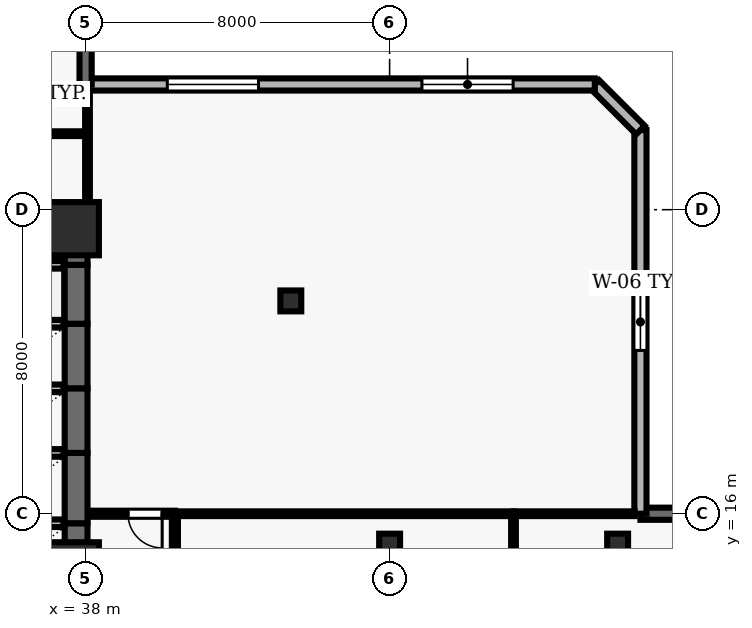
"""IFC4 building model, lengths in metres.
Left out: names, types, materials, properties, quantities, classifications, styles, units other than length and angle.
Written with IfcOpenShell. Run it as: python <this file> out.ifc"""

import sys

from ifc_helpers import new_model, si_unit, direction, frame, frame_2d, origin, origin_2d, place, context, subcontext, project, spatial, rectangle, hollow_rectangle, extrude, element, fill, save


model = new_model("IFC4")
c1 = context("Model", 3, precision=1e-05, world=origin(), true_north=direction((0.0, 1.0)))
c2 = subcontext(c1, "Body", "Model", "MODEL_VIEW")
j1 = project(units=[si_unit("LENGTHUNIT", "METRE"), si_unit("PLANEANGLEUNIT", "RADIAN")], contexts=[c1])
p1 = place(None, origin())
s1 = spatial("IfcSite", under=j1, at=p1, CompositionType="ELEMENT")
p2 = place(p1, origin())
s2 = spatial("IfcBuilding", under=s1, at=p2, CompositionType="ELEMENT")
p3 = place(p2, frame((0.0, 0.0, 54.4)))
s3 = spatial("IfcBuildingStorey", under=s2, at=p3, CompositionType="ELEMENT", Elevation=54.4)
for number, where, z_axis, x_axis in (
    (1, (37.65, 14.55, 0.0), (0.0, 0.0, 1.0), (1.0, 0.0, 0.0)),
    (2, (37.65, 23.5, 0.0), (0.0, 0.0, 1.0), (1.0, 0.0, 0.0)),
):
    element("IfcColumn", number, at=place(p3, frame(where, z_axis=z_axis, x_axis=x_axis)), inside=s3, PredefinedType="COLUMN", context=c2, shape_type="SweptSolid", body=[
        extrude(rectangle(XDim=1.4, YDim=1.4, at=origin_2d()), origin(), (0.0, 0.0, 1.0), 3.9),
    ])
for number, where, z_axis, x_axis in (
    (3, (46.0, 15.2, 0.0), (0.0, 0.0, 1.0), (1.0, 0.0, 0.0)),
    (4, (52.0, 15.2, 0.0), (0.0, 0.0, 1.0), (1.0, 0.0, 0.0)),
    (5, (43.4, 21.6, 0.0), (0.0, 0.0, 1.0), (1.0, 0.0, 0.0)),
):
    element("IfcColumn", number, at=place(p3, frame(where, z_axis=z_axis, x_axis=x_axis)), inside=s3, PredefinedType="COLUMN", context=c2, shape_type="SweptSolid", body=[
        extrude(hollow_rectangle(XDim=0.55, YDim=0.55, WallThickness=0.025, at=origin_2d()), origin(), (0.0, 0.0, 1.0), 3.9),
    ])
p4 = place(p3, frame((73.5, 16.0, 0.0), z_axis=(0.0, 0.0, 1.0), x_axis=(-1.0, 0.0, 0.0)))
e6 = element("IfcWall", 6, at=p4, inside=s3, PredefinedType="SOLIDWALL", context=c2, shape_type="SweptSolid", body=[
    extrude(rectangle(XDim=20.9, YDim=0.32, at=frame_2d((10.45, 0.0))), origin(), (0.0, 0.0, 1.0), 3.69),
])
p5 = place(p4, frame((12.05, 0.0, 0.0)))
e7 = element("IfcOpeningElement", 7, at=p5, cuts=e6, PredefinedType="OPENING", context=c2, shape_type="SweptSolid", body=[
    extrude(rectangle(XDim=1.0, YDim=2.2, at=frame_2d((0.5, 1.1))), frame((0.0, 0.17, 0.0), z_axis=(0.0, -1.0, 0.0), x_axis=(1.0, 0.0, 0.0)), (0.0, 0.0, 1.0), 0.34),
])
p6 = place(p4, frame((1.833, 0.0, 0.9)))
e8 = element("IfcOpeningElement", 8, at=p6, cuts=e6, PredefinedType="OPENING", context=c2, shape_type="SweptSolid", body=[
    extrude(rectangle(XDim=2.4, YDim=1.6, at=frame_2d((1.2, 0.8))), frame((0.0, 0.17, 0.0), z_axis=(0.0, -1.0, 0.0), x_axis=(1.0, 0.0, 0.0)), (0.0, 0.0, 1.0), 0.34),
])
p7 = place(p4, frame((16.667, 0.0, 0.9)))
e9 = element("IfcOpeningElement", 9, at=p7, cuts=e6, PredefinedType="OPENING", context=c2, shape_type="SweptSolid", body=[
    extrude(rectangle(XDim=2.4, YDim=1.6, at=frame_2d((1.2, 0.8))), frame((0.0, 0.17, 0.0), z_axis=(0.0, -1.0, 0.0), x_axis=(1.0, 0.0, 0.0)), (0.0, 0.0, 1.0), 0.34),
])
p8 = place(p3, frame((52.6, 16.0, 0.0), z_axis=(0.0, 0.0, 1.0), x_axis=(0.0, 1.0, 0.0)))
e10 = element("IfcWall", 10, at=p8, inside=s3, PredefinedType="SOLIDWALL", context=c2, shape_type="SweptSolid", body=[
    extrude(rectangle(XDim=10.095, YDim=0.32, at=frame_2d((5.047, 0.0))), origin(), (0.0, 0.0, 1.0), 3.69),
])
p9 = place(p8, frame((4.297, 0.0, 0.9)))
e11 = element("IfcOpeningElement", 11, at=p9, cuts=e10, PredefinedType="OPENING", context=c2, shape_type="SweptSolid", body=[
    extrude(rectangle(XDim=1.5, YDim=1.8, at=frame_2d((0.75, 0.9))), frame((0.0, 0.17, 0.0), z_axis=(0.0, -1.0, 0.0), x_axis=(1.0, 0.0, 0.0)), (0.0, 0.0, 1.0), 0.34),
])
p10 = place(p3, frame((52.6, 26.095, 0.0), z_axis=(0.0, 0.0, 1.0), x_axis=(-0.707178703759, 0.707034851297, 0.0)))
e12 = element("IfcWall", 12, at=p10, inside=s3, PredefinedType="SOLIDWALL", context=c2, shape_type="SweptSolid", body=[
    extrude(rectangle(XDim=1.697, YDim=0.32, at=frame_2d((0.849, 0.0))), origin(), (0.0, 0.0, 1.0), 3.69),
])
p11 = place(p3, frame((51.4, 27.295, 0.0), z_axis=(0.0, 0.0, 1.0), x_axis=(-1.0, 0.0, 0.0)))
e13 = element("IfcWall", 13, at=p11, inside=s3, PredefinedType="SOLIDWALL", context=c2, shape_type="SweptSolid", body=[
    extrude(rectangle(XDim=13.4, YDim=0.32, at=frame_2d((6.7, 0.0))), origin(), (0.0, 0.0, 1.0), 3.69),
])
p12 = place(p11, frame((2.15, 0.0, 0.9)))
e14 = element("IfcOpeningElement", 14, at=p12, cuts=e13, PredefinedType="OPENING", context=c2, shape_type="SweptSolid", body=[
    extrude(rectangle(XDim=2.4, YDim=1.8, at=frame_2d((1.2, 0.9))), frame((0.0, 0.17, 0.0), z_axis=(0.0, -1.0, 0.0), x_axis=(1.0, 0.0, 0.0)), (0.0, 0.0, 1.0), 0.34),
])
p13 = place(p11, frame((8.85, 0.0, 0.9)))
e15 = element("IfcOpeningElement", 15, at=p13, cuts=e13, PredefinedType="OPENING", context=c2, shape_type="SweptSolid", body=[
    extrude(rectangle(XDim=2.4, YDim=1.8, at=frame_2d((1.2, 0.9))), frame((0.0, 0.17, 0.0), z_axis=(0.0, -1.0, 0.0), x_axis=(1.0, 0.0, 0.0)), (0.0, 0.0, 1.0), 0.34),
])
p14 = place(p3, frame((38.0, 27.295, 0.0), z_axis=(0.0, 0.0, 1.0), x_axis=(0.0, 1.0, 0.0)))
e16 = element("IfcWall", 16, at=p14, inside=s3, PredefinedType="SOLIDWALL", context=c2, shape_type="SweptSolid", body=[
    extrude(rectangle(XDim=24.205, YDim=0.32, at=frame_2d((12.103, 0.0))), origin(), (0.0, 0.0, 1.0), 3.69),
])
p15 = place(p14, frame((16.303, 0.0, 0.0)))
e17 = element("IfcOpeningElement", 17, at=p15, cuts=e16, PredefinedType="OPENING", context=c2, shape_type="SweptSolid", body=[
    extrude(rectangle(XDim=1.0, YDim=2.2, at=frame_2d((0.5, 1.1))), frame((0.0, 0.17, 0.0), z_axis=(0.0, -1.0, 0.0), x_axis=(1.0, 0.0, 0.0)), (0.0, 0.0, 1.0), 0.34),
])
p16 = place(p14, frame((20.229, 0.0, 0.9)))
e18 = element("IfcOpeningElement", 18, at=p16, cuts=e16, PredefinedType="OPENING", context=c2, shape_type="SweptSolid", body=[
    extrude(rectangle(XDim=2.8, YDim=1.8, at=frame_2d((1.4, 0.9))), frame((0.0, 0.17, 0.0), z_axis=(0.0, -1.0, 0.0), x_axis=(1.0, 0.0, 0.0)), (0.0, 0.0, 1.0), 0.34),
])
p17 = place(p3, frame((37.75, 13.9, 0.0), z_axis=(0.0, 0.0, 1.0), x_axis=(0.0, 1.0, 0.0)))
e19 = element("IfcWall", 19, at=p17, inside=s3, PredefinedType="SHEAR", context=c2, shape_type="SweptSolid", body=[
    extrude(rectangle(XDim=1.85, YDim=0.6, at=frame_2d((0.925, 0.0))), origin(), (0.0, 0.0, 1.0), 3.69),
])
p18 = place(p3, frame((37.42, 15.75, 0.0), z_axis=(0.0, 0.0, 1.0), x_axis=(-1.0, 0.0, 0.0)))
e20 = element("IfcWall", 20, at=p18, inside=s3, PredefinedType="SOLIDWALL", context=c2, shape_type="SweptSolid", body=[
    extrude(rectangle(XDim=2.14, YDim=0.2, at=frame_2d((1.07, 0.0))), origin(), (0.0, 0.0, 1.0), 3.69),
])
p19 = place(p3, frame((37.75, 15.75, 0.0), z_axis=(0.0, 0.0, 1.0), x_axis=(0.0, 1.0, 0.0)))
e21 = element("IfcWall", 21, at=p19, inside=s3, PredefinedType="SHEAR", context=c2, shape_type="SweptSolid", body=[
    extrude(rectangle(XDim=1.85, YDim=0.6, at=frame_2d((0.925, 0.0))), origin(), (0.0, 0.0, 1.0), 3.69),
])
p20 = place(p3, frame((37.42, 17.6, 0.0), z_axis=(0.0, 0.0, 1.0), x_axis=(-1.0, 0.0, 0.0)))
e22 = element("IfcWall", 22, at=p20, inside=s3, PredefinedType="SOLIDWALL", context=c2, shape_type="SweptSolid", body=[
    extrude(rectangle(XDim=2.14, YDim=0.2, at=frame_2d((1.07, 0.0))), origin(), (0.0, 0.0, 1.0), 3.69),
])
p21 = place(p3, frame((37.75, 17.6, 0.0), z_axis=(0.0, 0.0, 1.0), x_axis=(0.0, 1.0, 0.0)))
e23 = element("IfcWall", 23, at=p21, inside=s3, PredefinedType="SHEAR", context=c2, shape_type="SweptSolid", body=[
    extrude(rectangle(XDim=1.7, YDim=0.6, at=frame_2d((0.85, 0.0))), origin(), (0.0, 0.0, 1.0), 3.69),
])
p22 = place(p3, frame((37.42, 19.3, 0.0), z_axis=(0.0, 0.0, 1.0), x_axis=(-1.0, 0.0, 0.0)))
e24 = element("IfcWall", 24, at=p22, inside=s3, PredefinedType="SOLIDWALL", context=c2, shape_type="SweptSolid", body=[
    extrude(rectangle(XDim=2.14, YDim=0.2, at=frame_2d((1.07, 0.0))), origin(), (0.0, 0.0, 1.0), 3.69),
])
p23 = place(p3, frame((37.75, 19.3, 0.0), z_axis=(0.0, 0.0, 1.0), x_axis=(0.0, 1.0, 0.0)))
e25 = element("IfcWall", 25, at=p23, inside=s3, PredefinedType="SHEAR", context=c2, shape_type="SweptSolid", body=[
    extrude(rectangle(XDim=1.7, YDim=0.6, at=frame_2d((0.85, 0.0))), origin(), (0.0, 0.0, 1.0), 3.69),
])
p24 = place(p3, frame((37.42, 21.0, 0.0), z_axis=(0.0, 0.0, 1.0), x_axis=(-1.0, 0.0, 0.0)))
e26 = element("IfcWall", 26, at=p24, inside=s3, PredefinedType="SOLIDWALL", context=c2, shape_type="SweptSolid", body=[
    extrude(rectangle(XDim=2.14, YDim=0.2, at=frame_2d((1.07, 0.0))), origin(), (0.0, 0.0, 1.0), 3.69),
])
p25 = place(p3, frame((37.75, 21.0, 0.0), z_axis=(0.0, 0.0, 1.0), x_axis=(0.0, 1.0, 0.0)))
e27 = element("IfcWall", 27, at=p25, inside=s3, PredefinedType="SHEAR", context=c2, shape_type="SweptSolid", body=[
    extrude(rectangle(XDim=1.55, YDim=0.6, at=frame_2d((0.775, 0.0))), origin(), (0.0, 0.0, 1.0), 3.69),
])
p26 = place(p3, frame((37.42, 22.55, 0.0), z_axis=(0.0, 0.0, 1.0), x_axis=(-1.0, 0.0, 0.0)))
e28 = element("IfcWall", 28, at=p26, inside=s3, PredefinedType="SOLIDWALL", context=c2, shape_type="SweptSolid", body=[
    extrude(rectangle(XDim=2.14, YDim=0.2, at=frame_2d((1.07, 0.0))), origin(), (0.0, 0.0, 1.0), 3.69),
])
p27 = place(p3, frame((37.75, 22.55, 0.0), z_axis=(0.0, 0.0, 1.0), x_axis=(0.0, 1.0, 0.0)))
e29 = element("IfcWall", 29, at=p27, inside=s3, PredefinedType="SHEAR", context=c2, shape_type="SweptSolid", body=[
    extrude(rectangle(XDim=1.5, YDim=0.6, at=frame_2d((0.75, 0.0))), origin(), (0.0, 0.0, 1.0), 3.69),
])
p28 = place(p3, frame((37.42, 24.05, 0.0), z_axis=(0.0, 0.0, 1.0), x_axis=(-1.0, 0.0, 0.0)))
e30 = element("IfcWall", 30, at=p28, inside=s3, PredefinedType="SOLIDWALL", context=c2, shape_type="SweptSolid", body=[
    extrude(rectangle(XDim=2.14, YDim=0.2, at=frame_2d((1.07, 0.0))), origin(), (0.0, 0.0, 1.0), 3.69),
])
p29 = place(p3, frame((35.15, 26.0, 0.0), z_axis=(0.0, 0.0, 1.0), x_axis=(1.0, 0.0, 0.0)))
e31 = element("IfcWall", 31, at=p29, inside=s3, PredefinedType="PARTITIONING", context=c2, shape_type="SweptSolid", body=[
    extrude(rectangle(XDim=2.7, YDim=0.125, at=frame_2d((1.35, 0.0))), origin(), (0.0, 0.0, 1.0), 3.69),
])
p30 = place(p3, frame((40.35, 16.0, 0.0), z_axis=(0.0, 0.0, 1.0), x_axis=(-1.0, 0.0, 0.0)))
e32 = element("IfcWall", 32, at=p30, inside=s3, PredefinedType="PARTITIONING", context=c2, shape_type="SweptSolid", body=[
    extrude(rectangle(XDim=2.27, YDim=0.16, at=frame_2d((1.135, 0.0))), origin(), (0.0, 0.0, 1.0), 3.69),
])
p31 = place(p30, frame((0.335, 0.0, 0.0)))
e33 = element("IfcOpeningElement", 33, at=p31, cuts=e32, PredefinedType="OPENING", context=c2, shape_type="SweptSolid", body=[
    extrude(rectangle(XDim=0.9, YDim=2.1, at=frame_2d((0.45, 1.05))), frame((0.0, 0.09, 0.0), z_axis=(0.0, -1.0, 0.0), x_axis=(1.0, 0.0, 0.0)), (0.0, 0.0, 1.0), 0.18),
])
p32 = place(p3, frame((49.26, 16.0, 0.0), z_axis=(0.0, 0.0, 1.0), x_axis=(1.0, 0.0, 0.0)))
e34 = element("IfcWall", 34, at=p32, inside=s3, PredefinedType="PARTITIONING", context=c2, shape_type="SweptSolid", body=[
    extrude(rectangle(XDim=3.185, YDim=0.125, at=frame_2d((1.593, 0.0))), origin(), (0.0, 0.0, 1.0), 3.39),
])
p33 = place(p3, frame((49.26, 16.0, 0.0), z_axis=(0.0, 0.0, 1.0), x_axis=(-1.0, 0.0, 0.0)))
e35 = element("IfcWall", 35, at=p33, inside=s3, PredefinedType="PARTITIONING", context=c2, shape_type="SweptSolid", body=[
    extrude(rectangle(XDim=8.91, YDim=0.125, at=frame_2d((4.455, 0.0))), origin(), (0.0, 0.0, 1.0), 3.69),
])
p34 = place(p3, frame((38.05, 27.14, 0.0), z_axis=(0.0, 0.0, 1.0), x_axis=(0.0, -1.0, 0.0)))
e36 = element("IfcWall", 36, at=p34, inside=s3, PredefinedType="PARTITIONING", context=c2, shape_type="SweptSolid", body=[
    extrude(rectangle(XDim=3.09, YDim=0.125, at=frame_2d((1.545, 0.0))), origin(), (0.0, 0.0, 1.0), 2.995),
])
p35 = place(p3, frame((40.35, 10.425, 0.0), z_axis=(0.0, 0.0, 1.0), x_axis=(0.0, 1.0, 0.0)))
e37 = element("IfcWall", 37, at=p35, inside=s3, PredefinedType="PARTITIONING", context=c2, shape_type="SweptSolid", body=[
    extrude(rectangle(XDim=5.5, YDim=0.16, at=frame_2d((2.75, 0.0))), origin(), (0.0, 0.0, 1.0), 3.227),
])
p36 = place(p3, frame((49.26, 10.425, 0.0), z_axis=(0.0, 0.0, 1.0), x_axis=(0.0, 1.0, 0.0)))
e38 = element("IfcWall", 38, at=p36, inside=s3, PredefinedType="PARTITIONING", context=c2, shape_type="SweptSolid", body=[
    extrude(rectangle(XDim=5.518, YDim=0.125, at=frame_2d((2.759, 0.0))), origin(), (0.0, 0.0, 1.0), 3.69),
])
p37 = place(p9, origin())
e39 = element("IfcWindow", 39, at=p37, inside=s3, PartitioningType="SINGLE_PANEL", PredefinedType="WINDOW", context=c2, shape_type="SweptSolid", body=[
    extrude(rectangle(XDim=1.5, YDim=1.8, at=frame_2d((0.75, 0.9))), frame((0.0, 0.03, 0.0), z_axis=(0.0, -1.0, 0.0), x_axis=(1.0, 0.0, 0.0)), (0.0, 0.0, 1.0), 0.06),
])
fill(e11, e39)
p38 = place(p12, origin())
e40 = element("IfcWindow", 40, at=p38, inside=s3, PartitioningType="SINGLE_PANEL", PredefinedType="WINDOW", context=c2, shape_type="SweptSolid", body=[
    extrude(rectangle(XDim=2.4, YDim=1.8, at=frame_2d((1.2, 0.9))), frame((0.0, 0.03, 0.0), z_axis=(0.0, -1.0, 0.0), x_axis=(1.0, 0.0, 0.0)), (0.0, 0.0, 1.0), 0.06),
])
fill(e14, e40)
p39 = place(p13, origin())
e41 = element("IfcWindow", 41, at=p39, inside=s3, PartitioningType="SINGLE_PANEL", PredefinedType="WINDOW", context=c2, shape_type="SweptSolid", body=[
    extrude(rectangle(XDim=2.4, YDim=1.8, at=frame_2d((1.2, 0.9))), frame((0.0, 0.03, 0.0), z_axis=(0.0, -1.0, 0.0), x_axis=(1.0, 0.0, 0.0)), (0.0, 0.0, 1.0), 0.06),
])
fill(e15, e41)
p40 = place(p31, origin())
e42 = element("IfcDoor", 42, at=p40, inside=s3, OperationType="SINGLE_SWING_LEFT", PredefinedType="DOOR", context=c2, shape_type="SweptSolid", body=[
    extrude(rectangle(XDim=0.9, YDim=2.1, at=frame_2d((0.45, 1.05))), frame((0.0, 0.025, 0.0), z_axis=(0.0, -1.0, 0.0), x_axis=(1.0, 0.0, 0.0)), (0.0, 0.0, 1.0), 0.05),
])
fill(e33, e42)
save(model, sys.argv[1])
